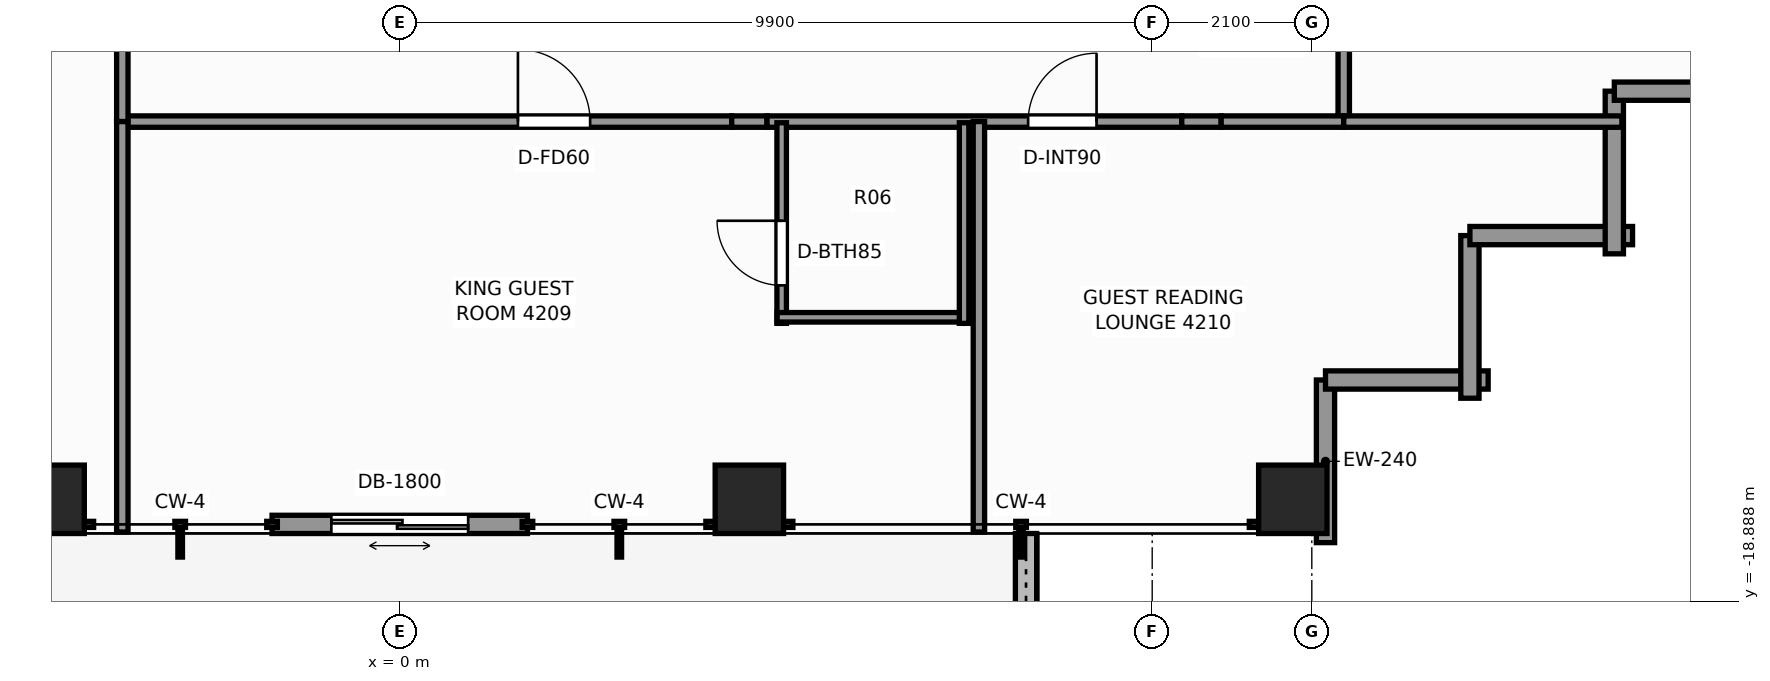
"""IFC4 building model, lengths in metres.
Left out: names, types, materials, properties, quantities, classifications, styles, units other than length and angle.
Written with IfcOpenShell. Run it as: python <this file> out.ifc"""

import sys

from ifc_helpers import new_model, si_unit, direction, frame, frame_2d, origin, origin_2d, place, context, subcontext, project, spatial, rectangle, extrude, element, fill, save


model = new_model("IFC4")
c1 = context("Model", 3, precision=1e-05, world=origin(), true_north=direction((0.0, 1.0)))
c2 = subcontext(c1, "Body", "Model", "MODEL_VIEW")
j1 = project(units=[si_unit("LENGTHUNIT", "METRE"), si_unit("PLANEANGLEUNIT", "RADIAN")], contexts=[c1])
p1 = place(None, origin())
s1 = spatial("IfcSite", under=j1, at=p1, CompositionType="ELEMENT")
p2 = place(p1, origin())
s2 = spatial("IfcBuilding", under=s1, at=p2, CompositionType="ELEMENT")
p3 = place(p2, frame((0.0, 0.0, 144.8)))
s3 = spatial("IfcBuildingStorey", under=s2, at=p3, CompositionType="ELEMENT", Elevation=144.8)
for number, where, z_axis, x_axis in (
    (1, (-4.6, -17.55, 0.0), (0.0, 0.0, 1.0), (1.0, 0.0, 0.0)),
    (2, (4.6, -17.55, 0.0), (0.0, 0.0, 1.0), (1.0, 0.0, 0.0)),
    (3, (11.75, -17.55, 0.0), (0.0, 0.0, 1.0), (1.0, 0.0, 0.0)),
):
    element("IfcColumn", number, at=place(p3, frame(where, z_axis=z_axis, x_axis=x_axis)), inside=s3, PredefinedType="COLUMN", context=c2, shape_type="SweptSolid", body=[
        extrude(rectangle(XDim=0.9, YDim=0.9, at=origin_2d()), origin(), (0.0, 0.0, 1.0), 3.3),
    ])
p4 = place(p3, frame((8.24, -20.674, -0.02), z_axis=(0.0, 0.0, 1.0), x_axis=(0.0, 1.0, 0.0)))
e4 = element("IfcWall", 4, at=p4, inside=s3, PredefinedType="PARAPET", context=c2, shape_type="SweptSolid", body=[
    extrude(rectangle(XDim=2.674, YDim=0.28, at=frame_2d((1.337, 0.0))), origin(), (0.0, 0.0, 1.0), 0.42),
])
p5 = place(p3, frame((1.68, -17.88, 0.0), z_axis=(0.0, 0.0, 1.0), x_axis=(-1.0, 0.0, 0.0)))
e5 = element("IfcWall", 5, at=p5, inside=s3, PredefinedType="STANDARD", context=c2, shape_type="SweptSolid", body=[
    extrude(rectangle(XDim=3.36, YDim=0.24, at=frame_2d((1.68, 0.0))), origin(), (0.0, 0.0, 1.0), 2.95),
])
p6 = place(p5, frame((0.78, 0.0, 0.0)))
e6 = element("IfcOpeningElement", 6, at=p6, cuts=e5, PredefinedType="OPENING", context=c2, shape_type="SweptSolid", body=[
    extrude(rectangle(XDim=1.8, YDim=2.2, at=frame_2d((0.9, 1.1))), frame((0.0, 0.13, 0.0), z_axis=(0.0, -1.0, 0.0), x_axis=(1.0, 0.0, 0.0)), (0.0, 0.0, 1.0), 0.26),
])
for number, where, z_axis, x_axis in (
    (7, (12.18, -15.98, 0.0), (0.0, 0.0, 1.0), (0.0, -1.0, 0.0)),
    (8, (14.32, -15.98, 0.0), (0.0, 0.0, 1.0), (-1.0, 0.0, 0.0)),
):
    element("IfcWall", number, at=place(p3, frame(where, z_axis=z_axis, x_axis=x_axis)), inside=s3, PredefinedType="STANDARD", context=c2, shape_type="SweptSolid", body=[
        extrude(rectangle(XDim=2.14, YDim=0.24, at=frame_2d((1.07, 0.0))), origin(), (0.0, 0.0, 1.0), 2.329),
    ])
for number, where, z_axis, x_axis in (
    (9, (14.08, -14.08, 0.0), (0.0, 0.0, 1.0), (0.0, -1.0, 0.0)),
    (10, (16.22, -14.08, 0.0), (0.0, 0.0, 1.0), (-1.0, 0.0, 0.0)),
):
    element("IfcWall", number, at=place(p3, frame(where, z_axis=z_axis, x_axis=x_axis)), inside=s3, PredefinedType="STANDARD", context=c2, shape_type="SweptSolid", body=[
        extrude(rectangle(XDim=2.14, YDim=0.24, at=frame_2d((1.07, 0.0))), origin(), (0.0, 0.0, 1.0), 2.329),
    ])
for number, where, z_axis, x_axis in (
    (11, (15.98, -12.18, 0.0), (0.0, 0.0, 1.0), (0.0, -1.0, 0.0)),
    (12, (18.12, -12.18, 0.0), (0.0, 0.0, 1.0), (-1.0, 0.0, 0.0)),
):
    element("IfcWall", number, at=place(p3, frame(where, z_axis=z_axis, x_axis=x_axis)), inside=s3, PredefinedType="STANDARD", context=c2, shape_type="SweptSolid", body=[
        extrude(rectangle(XDim=2.14, YDim=0.24, at=frame_2d((1.07, 0.0))), origin(), (0.0, 0.0, 1.0), 2.329),
    ])
p7 = place(p3, frame((12.42, -12.58, 0.0), z_axis=(0.0, 0.0, 1.0), x_axis=(0.0, 1.0, 0.0)))
e13 = element("IfcWall", 13, at=p7, inside=s3, PredefinedType="PARTITIONING", context=c2, shape_type="SweptSolid", body=[
    extrude(rectangle(XDim=1.811, YDim=0.15, at=frame_2d((0.906, 0.0))), origin(), (0.0, 0.0, 1.0), 2.95),
])
p8 = place(p3, frame((-3.65, -12.58, 0.0), z_axis=(0.0, 0.0, 1.0), x_axis=(1.0, 0.0, 0.0)))
e14 = element("IfcWall", 14, at=p8, inside=s3, PredefinedType="PARTITIONING", context=c2, shape_type="SweptSolid", body=[
    extrude(rectangle(XDim=8.017, YDim=0.15, at=frame_2d((4.009, 0.0))), origin(), (0.0, 0.0, 1.0), 2.475),
])
p9 = place(p8, frame((5.205, 0.0, 0.0)))
e15 = element("IfcOpeningElement", 15, at=p9, cuts=e14, PredefinedType="OPENING", context=c2, shape_type="SweptSolid", body=[
    extrude(rectangle(XDim=0.95, YDim=2.06, at=frame_2d((0.475, 1.03))), frame((0.0, 0.085, 0.0), z_axis=(0.0, -1.0, 0.0), x_axis=(1.0, 0.0, 0.0)), (0.0, 0.0, 1.0), 0.17),
])
p10 = place(p3, frame((4.367, -12.58, 0.0), z_axis=(0.0, 0.0, 1.0), x_axis=(1.0, 0.0, 0.0)))
e16 = element("IfcWall", 16, at=p10, inside=s3, PredefinedType="PARTITIONING", context=c2, shape_type="SweptSolid", body=[
    extrude(rectangle(XDim=0.465, YDim=0.15, at=frame_2d((0.232, 0.0))), origin(), (0.0, 0.0, 1.0), 2.162),
])
p11 = place(p3, frame((4.833, -12.58, 0.0), z_axis=(0.0, 0.0, 1.0), x_axis=(1.0, 0.0, 0.0)))
e17 = element("IfcWall", 17, at=p11, inside=s3, PredefinedType="PARTITIONING", context=c2, shape_type="SweptSolid", body=[
    extrude(rectangle(XDim=5.456, YDim=0.15, at=frame_2d((2.728, 0.0))), origin(), (0.0, 0.0, 1.0), 2.95),
])
p12 = place(p11, frame((3.435, 0.0, 0.0)))
e18 = element("IfcOpeningElement", 18, at=p12, cuts=e17, PredefinedType="OPENING", context=c2, shape_type="SweptSolid", body=[
    extrude(rectangle(XDim=0.9, YDim=2.06, at=frame_2d((0.45, 1.03))), frame((0.0, 0.085, 0.0), z_axis=(0.0, -1.0, 0.0), x_axis=(1.0, 0.0, 0.0)), (0.0, 0.0, 1.0), 0.17),
])
p13 = place(p3, frame((10.289, -12.58, 0.0), z_axis=(0.0, 0.0, 1.0), x_axis=(1.0, 0.0, 0.0)))
e19 = element("IfcWall", 19, at=p13, inside=s3, PredefinedType="PARTITIONING", context=c2, shape_type="SweptSolid", body=[
    extrude(rectangle(XDim=0.519, YDim=0.15, at=frame_2d((0.259, 0.0))), origin(), (0.0, 0.0, 1.0), 2.162),
])
p14 = place(p3, frame((10.808, -12.58, 0.0), z_axis=(0.0, 0.0, 1.0), x_axis=(1.0, 0.0, 0.0)))
e20 = element("IfcWall", 20, at=p14, inside=s3, PredefinedType="PARTITIONING", context=c2, shape_type="SweptSolid", body=[
    extrude(rectangle(XDim=1.612, YDim=0.15, at=frame_2d((0.806, 0.0))), origin(), (0.0, 0.0, 1.0), 2.95),
])
p15 = place(p3, frame((-3.65, -12.58, 0.0), z_axis=(0.0, 0.0, 1.0), x_axis=(0.0, 1.0, 0.0)))
e21 = element("IfcWall", 21, at=p15, inside=s3, PredefinedType="PARTITIONING", context=c2, shape_type="SweptSolid", body=[
    extrude(rectangle(XDim=2.68, YDim=0.15, at=frame_2d((1.34, 0.0))), origin(), (0.0, 0.0, 1.0), 2.95),
])
p16 = place(p3, frame((12.42, -12.58, 0.0), z_axis=(0.0, 0.0, 1.0), x_axis=(1.0, 0.0, 0.0)))
e22 = element("IfcWall", 22, at=p16, inside=s3, PredefinedType="PARTITIONING", context=c2, shape_type="SweptSolid", body=[
    extrude(rectangle(XDim=3.66, YDim=0.15, at=frame_2d((1.83, 0.0))), origin(), (0.0, 0.0, 1.0), 2.95),
])
for number, where, z_axis, x_axis in (
    (23, (-3.65, -17.98, 0.0), (0.0, 0.0, 1.0), (0.0, 1.0, 0.0)),
    (24, (7.62, -17.98, 0.0), (0.0, 0.0, 1.0), (0.0, 1.0, 0.0)),
):
    element("IfcWall", number, at=place(p3, frame(where, z_axis=z_axis, x_axis=x_axis)), inside=s3, PredefinedType="PARTITIONING", context=c2, shape_type="SweptSolid", body=[
        extrude(rectangle(XDim=5.4, YDim=0.15, at=frame_2d((2.7, 0.0))), origin(), (0.0, 0.0, 1.0), 2.319),
    ])
p17 = place(p3, frame((5.025, -15.235, 0.0), z_axis=(0.0, 0.0, 1.0), x_axis=(0.0, 1.0, 0.0)))
e25 = element("IfcWall", 25, at=p17, inside=s3, PredefinedType="PARTITIONING", context=c2, shape_type="SweptSolid", body=[
    extrude(rectangle(XDim=2.64, YDim=0.125, at=frame_2d((1.32, 0.0))), origin(), (0.0, 0.0, 1.0), 2.95),
])
p18 = place(p17, frame((0.5, 0.0, 0.0)))
e26 = element("IfcOpeningElement", 26, at=p18, cuts=e25, PredefinedType="OPENING", context=c2, shape_type="SweptSolid", body=[
    extrude(rectangle(XDim=0.85, YDim=2.03, at=frame_2d((0.425, 1.015))), frame((0.0, 0.073, 0.0), z_axis=(0.0, -1.0, 0.0), x_axis=(1.0, 0.0, 0.0)), (0.0, 0.0, 1.0), 0.145),
])
p19 = place(p3, frame((4.965, -15.155, 0.0), z_axis=(0.0, 0.0, 1.0), x_axis=(1.0, 0.0, 0.0)))
e27 = element("IfcWall", 27, at=p19, inside=s3, PredefinedType="PARTITIONING", context=c2, shape_type="SweptSolid", body=[
    extrude(rectangle(XDim=2.52, YDim=0.125, at=frame_2d((1.26, 0.0))), origin(), (0.0, 0.0, 1.0), 2.95),
])
p20 = place(p3, frame((7.425, -15.235, 0.0), z_axis=(0.0, 0.0, 1.0), x_axis=(0.0, 1.0, 0.0)))
e28 = element("IfcWall", 28, at=p20, inside=s3, PredefinedType="PARTITIONING", context=c2, shape_type="SweptSolid", body=[
    extrude(rectangle(XDim=2.64, YDim=0.125, at=frame_2d((1.32, 0.0))), origin(), (0.0, 0.0, 1.0), 2.95),
])
p21 = place(p6, origin())
e29 = element("IfcDoor", 29, at=p21, inside=s3, OperationType="DOUBLE_DOOR_SLIDING", PredefinedType="DOOR", context=c2, shape_type="SweptSolid", body=[
    extrude(rectangle(XDim=1.8, YDim=2.2, at=frame_2d((0.9, 1.1))), frame((0.0, 0.025, 0.0), z_axis=(0.0, -1.0, 0.0), x_axis=(1.0, 0.0, 0.0)), (0.0, 0.0, 1.0), 0.05),
])
fill(e6, e29)
p22 = place(p18, origin())
e30 = element("IfcDoor", 30, at=p22, inside=s3, OperationType="SINGLE_SWING_RIGHT", PredefinedType="DOOR", context=c2, shape_type="SweptSolid", body=[
    extrude(rectangle(XDim=0.85, YDim=2.03, at=frame_2d((0.425, 1.015))), frame((0.0, 0.025, 0.0), z_axis=(0.0, -1.0, 0.0), x_axis=(1.0, 0.0, 0.0)), (0.0, 0.0, 1.0), 0.05),
])
fill(e26, e30)
p23 = place(p9, origin())
e31 = element("IfcDoor", 31, at=p23, inside=s3, OperationType="SINGLE_SWING_LEFT", PredefinedType="DOOR", context=c2, shape_type="SweptSolid", body=[
    extrude(rectangle(XDim=0.95, YDim=2.06, at=frame_2d((0.475, 1.03))), frame((0.0, 0.025, 0.0), z_axis=(0.0, -1.0, 0.0), x_axis=(1.0, 0.0, 0.0)), (0.0, 0.0, 1.0), 0.05),
])
fill(e15, e31)
p24 = place(p12, origin())
e32 = element("IfcDoor", 32, at=p24, inside=s3, OperationType="SINGLE_SWING_RIGHT", PredefinedType="DOOR", context=c2, shape_type="SweptSolid", body=[
    extrude(rectangle(XDim=0.9, YDim=2.06, at=frame_2d((0.45, 1.03))), frame((0.0, 0.025, 0.0), z_axis=(0.0, -1.0, 0.0), x_axis=(1.0, 0.0, 0.0)), (0.0, 0.0, 1.0), 0.05),
])
fill(e18, e32)
save(model, sys.argv[1])
